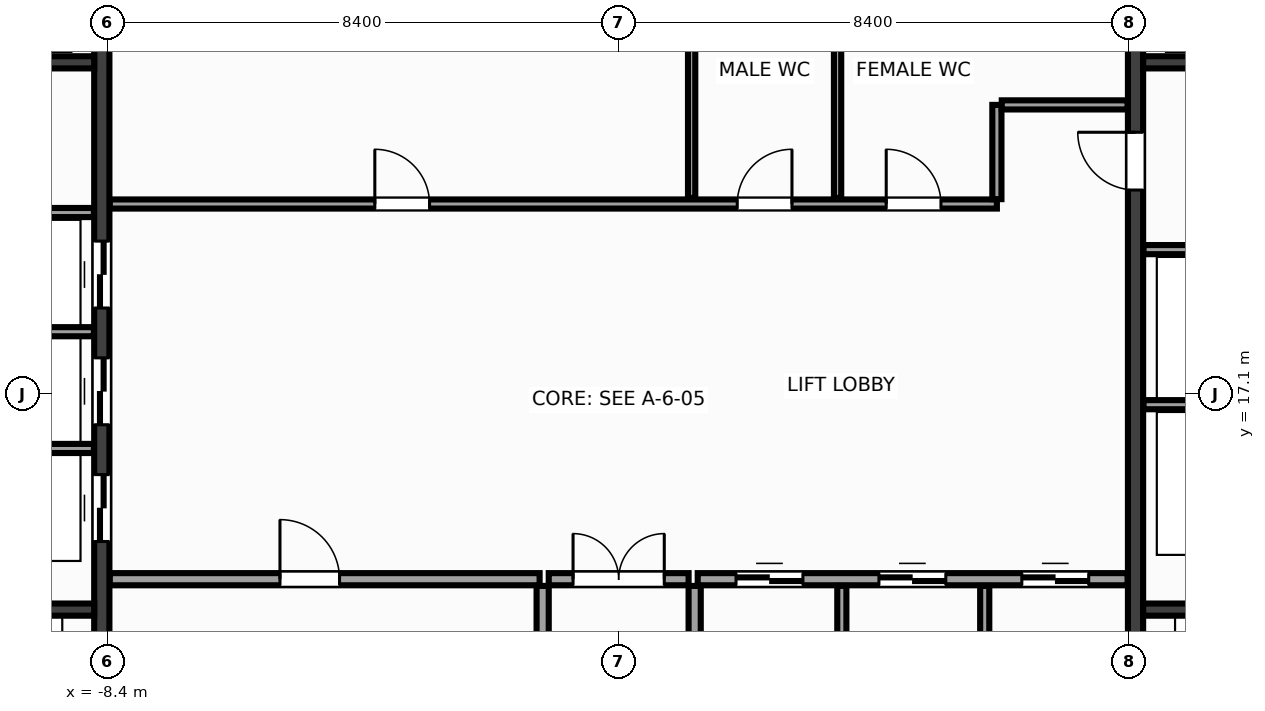
"""IFC4 building model, lengths in metres.
Left out: names, types, materials, properties, quantities, classifications, styles, units other than length and angle.
Written with IfcOpenShell. Run it as: python <this file> out.ifc"""

import sys

from ifc_helpers import new_model, si_unit, direction, frame, frame_2d, origin, place, context, subcontext, project, spatial, rectangle, extrude, source, transform, mapped, element, fill, save


model = new_model("IFC4")
c1 = context("Model", 3, precision=1e-05, world=origin(), true_north=direction((0.0, 1.0)))
c2 = subcontext(c1, "Body", "Model", "MODEL_VIEW")
j1 = project(units=[si_unit("LENGTHUNIT", "METRE"), si_unit("PLANEANGLEUNIT", "RADIAN")], contexts=[c1])
p1 = place(None, origin())
s1 = spatial("IfcSite", under=j1, at=p1, CompositionType="ELEMENT")
p2 = place(p1, origin())
s2 = spatial("IfcBuilding", under=s1, at=p2, CompositionType="ELEMENT")
p3 = place(p2, frame((0.0, 0.0, 167.6)))
s3 = spatial("IfcBuildingStorey", under=s2, at=p3, CompositionType="ELEMENT", Elevation=167.6)
m1 = source(origin(), c2, "Body", "SweptSolid", [
    extrude(rectangle(XDim=12.95, YDim=0.25, at=frame_2d((6.475, 0.0))), origin(), (0.0, 0.0, 1.0), 3.6),
])
p4 = place(p3, frame((-8.5, 10.525, 0.0), z_axis=(0.0, 0.0, 1.0), x_axis=(0.0, 1.0, 0.0)))
e1 = element("IfcWall", 1, at=p4, inside=s3, PredefinedType="SHEAR", context=c2, shape_type="MappedRepresentation", body=[
    mapped(m1, transform((0.0, 0.0, 0.0), x_axis=(1.0, 0.0, 0.0), y_axis=(0.0, 1.0, 0.0), z_axis=(0.0, 0.0, 1.0), scale=1.0)),
])
p5 = place(p4, frame((4.145, 0.0, 0.0)))
e2 = element("IfcOpeningElement", 2, at=p5, cuts=e1, PredefinedType="OPENING", context=c2, shape_type="SweptSolid", body=[
    extrude(rectangle(XDim=1.1, YDim=2.15, at=frame_2d((0.55, 1.075))), frame((0.0, 0.137, 0.0), z_axis=(0.0, -1.0, 0.0), x_axis=(1.0, 0.0, 0.0)), (0.0, 0.0, 1.0), 0.274),
])
p6 = place(p4, frame((6.065, 0.0, 0.0)))
e3 = element("IfcOpeningElement", 3, at=p6, cuts=e1, PredefinedType="OPENING", context=c2, shape_type="SweptSolid", body=[
    extrude(rectangle(XDim=1.1, YDim=2.15, at=frame_2d((0.55, 1.075))), frame((0.0, 0.137, 0.0), z_axis=(0.0, -1.0, 0.0), x_axis=(1.0, 0.0, 0.0)), (0.0, 0.0, 1.0), 0.274),
])
p7 = place(p4, frame((7.985, 0.0, 0.0)))
e4 = element("IfcOpeningElement", 4, at=p7, cuts=e1, PredefinedType="OPENING", context=c2, shape_type="SweptSolid", body=[
    extrude(rectangle(XDim=1.1, YDim=2.15, at=frame_2d((0.55, 1.075))), frame((0.0, 0.137, 0.0), z_axis=(0.0, -1.0, 0.0), x_axis=(1.0, 0.0, 0.0)), (0.0, 0.0, 1.0), 0.274),
])
p8 = place(p3, frame((8.5, 10.525, 0.0), z_axis=(0.0, 0.0, 1.0), x_axis=(0.0, 1.0, 0.0)))
e5 = element("IfcWall", 5, at=p8, inside=s3, PredefinedType="SHEAR", context=c2, shape_type="MappedRepresentation", body=[
    mapped(m1, transform((0.0, 0.0, 0.0), x_axis=(1.0, 0.0, 0.0), y_axis=(0.0, 1.0, 0.0), z_axis=(0.0, 0.0, 1.0), scale=1.0)),
])
p9 = place(p8, frame((9.925, 0.0, 0.0)))
e6 = element("IfcOpeningElement", 6, at=p9, cuts=e5, PredefinedType="OPENING", context=c2, shape_type="SweptSolid", body=[
    extrude(rectangle(XDim=0.95, YDim=2.15, at=frame_2d((0.475, 1.075))), frame((0.0, 0.137, 0.0), z_axis=(0.0, -1.0, 0.0), x_axis=(1.0, 0.0, 0.0)), (0.0, 0.0, 1.0), 0.274),
])
m2 = source(origin(), c2, "Body", "SweptSolid", [
    extrude(rectangle(XDim=2.825, YDim=0.2, at=frame_2d((1.413, 0.0))), origin(), (0.0, 0.0, 1.0), 3.6),
])
for number, where, z_axis, x_axis in (
    (7, (-11.45, 13.55, 0.0), (0.0, 0.0, 1.0), (1.0, 0.0, 0.0)),
    (8, (8.625, 13.55, 0.0), (0.0, 0.0, 1.0), (1.0, 0.0, 0.0)),
):
    element("IfcWall", number, at=place(p3, frame(where, z_axis=z_axis, x_axis=x_axis)), inside=s3, PredefinedType="SHEAR", context=c2, shape_type="MappedRepresentation", body=[
        mapped(m2, transform((0.0, 0.0, 0.0), x_axis=(1.0, 0.0, 0.0), y_axis=(0.0, 1.0, 0.0), z_axis=(0.0, 0.0, 1.0), scale=1.0)),
    ])
m3 = source(origin(), c2, "Body", "SweptSolid", [
    extrude(rectangle(XDim=3.02, YDim=0.2, at=frame_2d((1.51, 0.0))), origin(), (0.0, 0.0, 1.0), 3.6),
])
for number, where, z_axis, x_axis in (
    (9, (-11.645, 22.55, 0.0), (0.0, 0.0, 1.0), (1.0, 0.0, 0.0)),
    (10, (8.625, 22.55, 0.0), (0.0, 0.0, 1.0), (1.0, 0.0, 0.0)),
):
    element("IfcWall", number, at=place(p3, frame(where, z_axis=z_axis, x_axis=x_axis)), inside=s3, PredefinedType="SHEAR", context=c2, shape_type="MappedRepresentation", body=[
        mapped(m3, transform((0.0, 0.0, 0.0), x_axis=(1.0, 0.0, 0.0), y_axis=(0.0, 1.0, 0.0), z_axis=(0.0, 0.0, 1.0), scale=1.0)),
    ])
m4 = source(origin(), c2, "Body", "SweptSolid", [
    extrude(rectangle(XDim=3.01, YDim=0.15, at=frame_2d((1.505, 0.0))), origin(), (0.0, 0.0, 1.0), 3.38),
])
for number, where, z_axis, x_axis in (
    (11, (-11.64, 16.2, 0.0), (0.0, 0.0, 1.0), (1.0, 0.0, 0.0)),
    (12, (-11.64, 18.12, 0.0), (0.0, 0.0, 1.0), (1.0, 0.0, 0.0)),
    (13, (-11.64, 20.08, 0.0), (0.0, 0.0, 1.0), (1.0, 0.0, 0.0)),
    (14, (8.63, 16.92, 0.0), (0.0, 0.0, 1.0), (1.0, 0.0, 0.0)),
    (15, (8.63, 19.47, 0.0), (0.0, 0.0, 1.0), (1.0, 0.0, 0.0)),
):
    element("IfcWall", number, at=place(p3, frame(where, z_axis=z_axis, x_axis=x_axis)), inside=s3, PredefinedType="PARTITIONING", context=c2, shape_type="MappedRepresentation", body=[
        mapped(m4, transform((0.0, 0.0, 0.0), x_axis=(1.0, 0.0, 0.0), y_axis=(0.0, 1.0, 0.0), z_axis=(0.0, 0.0, 1.0), scale=1.0)),
    ])
m5 = source(origin(), c2, "Body", "SweptSolid", [
    extrude(rectangle(XDim=7.07, YDim=0.2, at=frame_2d((3.535, 0.0))), origin(), (0.0, 0.0, 1.0), 3.38),
])
p10 = place(p3, frame((-8.37, 14.05, 0.0), z_axis=(0.0, 0.0, 1.0), x_axis=(1.0, 0.0, 0.0)))
e16 = element("IfcWall", 16, at=p10, inside=s3, PredefinedType="PARTITIONING", context=c2, shape_type="MappedRepresentation", body=[
    mapped(m5, transform((0.0, 0.0, 0.0), x_axis=(1.0, 0.0, 0.0), y_axis=(0.0, 1.0, 0.0), z_axis=(0.0, 0.0, 1.0), scale=1.0)),
])
p11 = place(p10, frame((2.8, 0.0, 0.0)))
e17 = element("IfcOpeningElement", 17, at=p11, cuts=e16, PredefinedType="OPENING", context=c2, shape_type="SweptSolid", body=[
    extrude(rectangle(XDim=0.98, YDim=2.15, at=frame_2d((0.49, 1.075))), frame((0.0, 0.112, 0.0), z_axis=(0.0, -1.0, 0.0), x_axis=(1.0, 0.0, 0.0)), (0.0, 0.0, 1.0), 0.224),
])
p12 = place(p3, frame((1.3, 14.05, 0.0), z_axis=(0.0, 0.0, 1.0), x_axis=(1.0, 0.0, 0.0)))
e18 = element("IfcWall", 18, at=p12, inside=s3, PredefinedType="PARTITIONING", context=c2, shape_type="MappedRepresentation", body=[
    mapped(m5, transform((0.0, 0.0, 0.0), x_axis=(1.0, 0.0, 0.0), y_axis=(0.0, 1.0, 0.0), z_axis=(0.0, 0.0, 1.0), scale=1.0)),
])
p13 = place(p12, frame((0.63, 0.0, 0.0)))
e19 = element("IfcOpeningElement", 19, at=p13, cuts=e18, PredefinedType="OPENING", context=c2, shape_type="SweptSolid", body=[
    extrude(rectangle(XDim=1.1, YDim=2.15, at=frame_2d((0.55, 1.075))), frame((0.0, 0.112, 0.0), z_axis=(0.0, -1.0, 0.0), x_axis=(1.0, 0.0, 0.0)), (0.0, 0.0, 1.0), 0.224),
])
p14 = place(p12, frame((2.98, 0.0, 0.0)))
e20 = element("IfcOpeningElement", 20, at=p14, cuts=e18, PredefinedType="OPENING", context=c2, shape_type="SweptSolid", body=[
    extrude(rectangle(XDim=1.1, YDim=2.15, at=frame_2d((0.55, 1.075))), frame((0.0, 0.112, 0.0), z_axis=(0.0, -1.0, 0.0), x_axis=(1.0, 0.0, 0.0)), (0.0, 0.0, 1.0), 0.224),
])
p15 = place(p12, frame((5.33, 0.0, 0.0)))
e21 = element("IfcOpeningElement", 21, at=p15, cuts=e18, PredefinedType="OPENING", context=c2, shape_type="SweptSolid", body=[
    extrude(rectangle(XDim=1.1, YDim=2.15, at=frame_2d((0.55, 1.075))), frame((0.0, 0.112, 0.0), z_axis=(0.0, -1.0, 0.0), x_axis=(1.0, 0.0, 0.0)), (0.0, 0.0, 1.0), 0.224),
])
m6 = source(origin(), c2, "Body", "SweptSolid", [
    extrude(rectangle(XDim=3.415, YDim=0.2, at=frame_2d((1.708, 0.0))), origin(), (0.0, 0.0, 1.0), 3.38),
])
for number, where, z_axis, x_axis in (
    (22, (-1.25, 10.525, 0.0), (0.0, 0.0, 1.0), (0.0, 1.0, 0.0)),
    (23, (1.25, 10.525, 0.0), (0.0, 0.0, 1.0), (0.0, 1.0, 0.0)),
):
    element("IfcWall", number, at=place(p3, frame(where, z_axis=z_axis, x_axis=x_axis)), inside=s3, PredefinedType="PARTITIONING", context=c2, shape_type="MappedRepresentation", body=[
        mapped(m6, transform((0.0, 0.0, 0.0), x_axis=(1.0, 0.0, 0.0), y_axis=(0.0, 1.0, 0.0), z_axis=(0.0, 0.0, 1.0), scale=1.0)),
    ])
m7 = source(origin(), c2, "Body", "SweptSolid", [
    extrude(rectangle(XDim=2.3, YDim=0.2, at=frame_2d((1.15, 0.0))), origin(), (0.0, 0.0, 1.0), 3.38),
])
p16 = place(p3, frame((-1.15, 14.05, 0.0), z_axis=(0.0, 0.0, 1.0), x_axis=(1.0, 0.0, 0.0)))
e24 = element("IfcWall", 24, at=p16, inside=s3, PredefinedType="PARTITIONING", context=c2, shape_type="MappedRepresentation", body=[
    mapped(m7, transform((0.0, 0.0, 0.0), x_axis=(1.0, 0.0, 0.0), y_axis=(0.0, 1.0, 0.0), z_axis=(0.0, 0.0, 1.0), scale=1.0)),
])
p17 = place(p16, frame((0.4, 0.0, 0.0)))
e25 = element("IfcOpeningElement", 25, at=p17, cuts=e24, PredefinedType="OPENING", context=c2, shape_type="SweptSolid", body=[
    extrude(rectangle(XDim=1.5, YDim=2.2, at=frame_2d((0.75, 1.1))), frame((0.0, 0.112, 0.0), z_axis=(0.0, -1.0, 0.0), x_axis=(1.0, 0.0, 0.0)), (0.0, 0.0, 1.0), 0.224),
])
m8 = source(origin(), c2, "Body", "SweptSolid", [
    extrude(rectangle(XDim=14.59, YDim=0.15, at=frame_2d((7.295, 0.0))), origin(), (0.0, 0.0, 1.0), 3.38),
])
p18 = place(p3, frame((-8.37, 20.22, 0.0), z_axis=(0.0, 0.0, 1.0), x_axis=(1.0, 0.0, 0.0)))
e26 = element("IfcWall", 26, at=p18, inside=s3, PredefinedType="PARTITIONING", context=c2, shape_type="MappedRepresentation", body=[
    mapped(m8, transform((0.0, 0.0, 0.0), x_axis=(1.0, 0.0, 0.0), y_axis=(0.0, 1.0, 0.0), z_axis=(0.0, 0.0, 1.0), scale=1.0)),
])
p19 = place(p18, frame((4.36, 0.0, 0.0)))
e27 = element("IfcOpeningElement", 27, at=p19, cuts=e26, PredefinedType="OPENING", context=c2, shape_type="SweptSolid", body=[
    extrude(rectangle(XDim=0.9, YDim=2.15, at=frame_2d((0.45, 1.075))), frame((0.0, 0.087, 0.0), z_axis=(0.0, -1.0, 0.0), x_axis=(1.0, 0.0, 0.0)), (0.0, 0.0, 1.0), 0.174),
])
p20 = place(p18, frame((10.32, 0.0, 0.0)))
e28 = element("IfcOpeningElement", 28, at=p20, cuts=e26, PredefinedType="OPENING", context=c2, shape_type="SweptSolid", body=[
    extrude(rectangle(XDim=0.9, YDim=2.15, at=frame_2d((0.45, 1.075))), frame((0.0, 0.087, 0.0), z_axis=(0.0, -1.0, 0.0), x_axis=(1.0, 0.0, 0.0)), (0.0, 0.0, 1.0), 0.174),
])
p21 = place(p18, frame((12.77, 0.0, 0.0)))
e29 = element("IfcOpeningElement", 29, at=p21, cuts=e26, PredefinedType="OPENING", context=c2, shape_type="SweptSolid", body=[
    extrude(rectangle(XDim=0.9, YDim=2.15, at=frame_2d((0.45, 1.075))), frame((0.0, 0.087, 0.0), z_axis=(0.0, -1.0, 0.0), x_axis=(1.0, 0.0, 0.0)), (0.0, 0.0, 1.0), 0.174),
])
m9 = source(origin(), c2, "Body", "SweptSolid", [
    extrude(rectangle(XDim=1.55, YDim=0.15, at=frame_2d((0.775, 0.0))), origin(), (0.0, 0.0, 1.0), 3.38),
])
p22 = place(p3, frame((6.22, 20.3, 0.0), z_axis=(0.0, 0.0, 1.0), x_axis=(0.0, 1.0, 0.0)))
e30 = element("IfcWall", 30, at=p22, inside=s3, PredefinedType="PARTITIONING", context=c2, shape_type="MappedRepresentation", body=[
    mapped(m9, transform((0.0, 0.0, 0.0), x_axis=(1.0, 0.0, 0.0), y_axis=(0.0, 1.0, 0.0), z_axis=(0.0, 0.0, 1.0), scale=1.0)),
])
m10 = source(origin(), c2, "Body", "SweptSolid", [
    extrude(rectangle(XDim=2.07, YDim=0.15, at=frame_2d((1.035, 0.0))), origin(), (0.0, 0.0, 1.0), 3.38),
])
p23 = place(p3, frame((6.3, 21.85, 0.0), z_axis=(0.0, 0.0, 1.0), x_axis=(1.0, 0.0, 0.0)))
e31 = element("IfcWall", 31, at=p23, inside=s3, PredefinedType="PARTITIONING", context=c2, shape_type="MappedRepresentation", body=[
    mapped(m10, transform((0.0, 0.0, 0.0), x_axis=(1.0, 0.0, 0.0), y_axis=(0.0, 1.0, 0.0), z_axis=(0.0, 0.0, 1.0), scale=1.0)),
])
m11 = source(origin(), c2, "Body", "SweptSolid", [
    extrude(rectangle(XDim=3.415, YDim=0.15, at=frame_2d((1.708, 0.0))), origin(), (0.0, 0.0, 1.0), 3.38),
])
for number, where, z_axis, x_axis in (
    (32, (3.67, 10.525, 0.0), (0.0, 0.0, 1.0), (0.0, 1.0, 0.0)),
    (33, (6.02, 10.525, 0.0), (0.0, 0.0, 1.0), (0.0, 1.0, 0.0)),
):
    element("IfcWall", number, at=place(p3, frame(where, z_axis=z_axis, x_axis=x_axis)), inside=s3, PredefinedType="PARTITIONING", context=c2, shape_type="MappedRepresentation", body=[
        mapped(m11, transform((0.0, 0.0, 0.0), x_axis=(1.0, 0.0, 0.0), y_axis=(0.0, 1.0, 0.0), z_axis=(0.0, 0.0, 1.0), scale=1.0)),
    ])
m12 = source(origin(), c2, "Body", "SweptSolid", [
    extrude(rectangle(XDim=3.115, YDim=0.12, at=frame_2d((1.558, 0.0))), origin(), (0.0, 0.0, 1.0), 3.38),
])
for number, where, z_axis, x_axis in (
    (34, (1.2, 20.32, 0.0), (0.0, 0.0, 1.0), (0.0, 1.0, 0.0)),
    (35, (3.6, 20.32, 0.0), (0.0, 0.0, 1.0), (0.0, 1.0, 0.0)),
):
    element("IfcWall", number, at=place(p3, frame(where, z_axis=z_axis, x_axis=x_axis)), inside=s3, PredefinedType="PARTITIONING", context=c2, shape_type="MappedRepresentation", body=[
        mapped(m12, transform((0.0, 0.0, 0.0), x_axis=(1.0, 0.0, 0.0), y_axis=(0.0, 1.0, 0.0), z_axis=(0.0, 0.0, 1.0), scale=1.0)),
    ])
m13 = source(origin(), c2, "Body", "SweptSolid", [
    extrude(rectangle(XDim=1.1, YDim=2.15, at=frame_2d((0.55, 1.075))), frame((0.0, 0.025, 0.0), z_axis=(0.0, -1.0, 0.0), x_axis=(1.0, 0.0, 0.0)), (0.0, 0.0, 1.0), 0.05),
])
p24 = place(p5, origin())
e36 = element("IfcDoor", 36, at=p24, inside=s3, OperationType="DOUBLE_DOOR_SLIDING", PredefinedType="DOOR", context=c2, shape_type="MappedRepresentation", body=[
    mapped(m13, transform((0.0, 0.0, 0.0), x_axis=(1.0, 0.0, 0.0), y_axis=(0.0, 1.0, 0.0), z_axis=(0.0, 0.0, 1.0), scale=1.0)),
])
fill(e2, e36)
p25 = place(p6, origin())
e37 = element("IfcDoor", 37, at=p25, inside=s3, OperationType="DOUBLE_DOOR_SLIDING", PredefinedType="DOOR", context=c2, shape_type="MappedRepresentation", body=[
    mapped(m13, transform((0.0, 0.0, 0.0), x_axis=(1.0, 0.0, 0.0), y_axis=(0.0, 1.0, 0.0), z_axis=(0.0, 0.0, 1.0), scale=1.0)),
])
fill(e3, e37)
p26 = place(p7, origin())
e38 = element("IfcDoor", 38, at=p26, inside=s3, OperationType="DOUBLE_DOOR_SLIDING", PredefinedType="DOOR", context=c2, shape_type="MappedRepresentation", body=[
    mapped(m13, transform((0.0, 0.0, 0.0), x_axis=(1.0, 0.0, 0.0), y_axis=(0.0, 1.0, 0.0), z_axis=(0.0, 0.0, 1.0), scale=1.0)),
])
fill(e4, e38)
m14 = source(origin(), c2, "Body", "SweptSolid", [
    extrude(rectangle(XDim=0.95, YDim=2.15, at=frame_2d((0.475, 1.075))), frame((0.0, 0.025, 0.0), z_axis=(0.0, -1.0, 0.0), x_axis=(1.0, 0.0, 0.0)), (0.0, 0.0, 1.0), 0.05),
])
p27 = place(p9, origin())
e39 = element("IfcDoor", 39, at=p27, inside=s3, OperationType="SINGLE_SWING_RIGHT", PredefinedType="DOOR", context=c2, shape_type="MappedRepresentation", body=[
    mapped(m14, transform((0.0, 0.0, 0.0), x_axis=(1.0, 0.0, 0.0), y_axis=(0.0, 1.0, 0.0), z_axis=(0.0, 0.0, 1.0), scale=1.0)),
])
fill(e6, e39)
m15 = source(origin(), c2, "Body", "SweptSolid", [
    extrude(rectangle(XDim=0.98, YDim=2.15, at=frame_2d((0.49, 1.075))), frame((0.0, 0.025, 0.0), z_axis=(0.0, -1.0, 0.0), x_axis=(1.0, 0.0, 0.0)), (0.0, 0.0, 1.0), 0.05),
])
p28 = place(p11, origin())
e40 = element("IfcDoor", 40, at=p28, inside=s3, OperationType="SINGLE_SWING_LEFT", PredefinedType="DOOR", context=c2, shape_type="MappedRepresentation", body=[
    mapped(m15, transform((0.0, 0.0, 0.0), x_axis=(1.0, 0.0, 0.0), y_axis=(0.0, 1.0, 0.0), z_axis=(0.0, 0.0, 1.0), scale=1.0)),
])
fill(e17, e40)
p29 = place(p13, origin())
e41 = element("IfcDoor", 41, at=p29, inside=s3, OperationType="DOUBLE_DOOR_SLIDING", PredefinedType="DOOR", context=c2, shape_type="MappedRepresentation", body=[
    mapped(m13, transform((0.0, 0.0, 0.0), x_axis=(1.0, 0.0, 0.0), y_axis=(0.0, 1.0, 0.0), z_axis=(0.0, 0.0, 1.0), scale=1.0)),
])
fill(e19, e41)
p30 = place(p14, origin())
e42 = element("IfcDoor", 42, at=p30, inside=s3, OperationType="DOUBLE_DOOR_SLIDING", PredefinedType="DOOR", context=c2, shape_type="MappedRepresentation", body=[
    mapped(m13, transform((0.0, 0.0, 0.0), x_axis=(1.0, 0.0, 0.0), y_axis=(0.0, 1.0, 0.0), z_axis=(0.0, 0.0, 1.0), scale=1.0)),
])
fill(e20, e42)
p31 = place(p15, origin())
e43 = element("IfcDoor", 43, at=p31, inside=s3, OperationType="DOUBLE_DOOR_SLIDING", PredefinedType="DOOR", context=c2, shape_type="MappedRepresentation", body=[
    mapped(m13, transform((0.0, 0.0, 0.0), x_axis=(1.0, 0.0, 0.0), y_axis=(0.0, 1.0, 0.0), z_axis=(0.0, 0.0, 1.0), scale=1.0)),
])
fill(e21, e43)
m16 = source(origin(), c2, "Body", "SweptSolid", [
    extrude(rectangle(XDim=1.5, YDim=2.2, at=frame_2d((0.75, 1.1))), frame((0.0, 0.025, 0.0), z_axis=(0.0, -1.0, 0.0), x_axis=(1.0, 0.0, 0.0)), (0.0, 0.0, 1.0), 0.05),
])
p32 = place(p17, origin())
e44 = element("IfcDoor", 44, at=p32, inside=s3, OperationType="DOUBLE_DOOR_SINGLE_SWING", PredefinedType="DOOR", context=c2, shape_type="MappedRepresentation", body=[
    mapped(m16, transform((0.0, 0.0, 0.0), x_axis=(1.0, 0.0, 0.0), y_axis=(0.0, 1.0, 0.0), z_axis=(0.0, 0.0, 1.0), scale=1.0)),
])
fill(e25, e44)
m17 = source(origin(), c2, "Body", "SweptSolid", [
    extrude(rectangle(XDim=0.9, YDim=2.15, at=frame_2d((0.45, 1.075))), frame((0.0, 0.025, 0.0), z_axis=(0.0, -1.0, 0.0), x_axis=(1.0, 0.0, 0.0)), (0.0, 0.0, 1.0), 0.05),
])
p33 = place(p19, origin())
e45 = element("IfcDoor", 45, at=p33, inside=s3, OperationType="SINGLE_SWING_LEFT", PredefinedType="DOOR", context=c2, shape_type="MappedRepresentation", body=[
    mapped(m17, transform((0.0, 0.0, 0.0), x_axis=(1.0, 0.0, 0.0), y_axis=(0.0, 1.0, 0.0), z_axis=(0.0, 0.0, 1.0), scale=1.0)),
])
fill(e27, e45)
p34 = place(p20, origin())
e46 = element("IfcDoor", 46, at=p34, inside=s3, OperationType="SINGLE_SWING_RIGHT", PredefinedType="DOOR", context=c2, shape_type="MappedRepresentation", body=[
    mapped(m17, transform((0.0, 0.0, 0.0), x_axis=(1.0, 0.0, 0.0), y_axis=(0.0, 1.0, 0.0), z_axis=(0.0, 0.0, 1.0), scale=1.0)),
])
fill(e28, e46)
p35 = place(p21, origin())
e47 = element("IfcDoor", 47, at=p35, inside=s3, OperationType="SINGLE_SWING_LEFT", PredefinedType="DOOR", context=c2, shape_type="MappedRepresentation", body=[
    mapped(m17, transform((0.0, 0.0, 0.0), x_axis=(1.0, 0.0, 0.0), y_axis=(0.0, 1.0, 0.0), z_axis=(0.0, 0.0, 1.0), scale=1.0)),
])
fill(e29, e47)
save(model, sys.argv[1])
